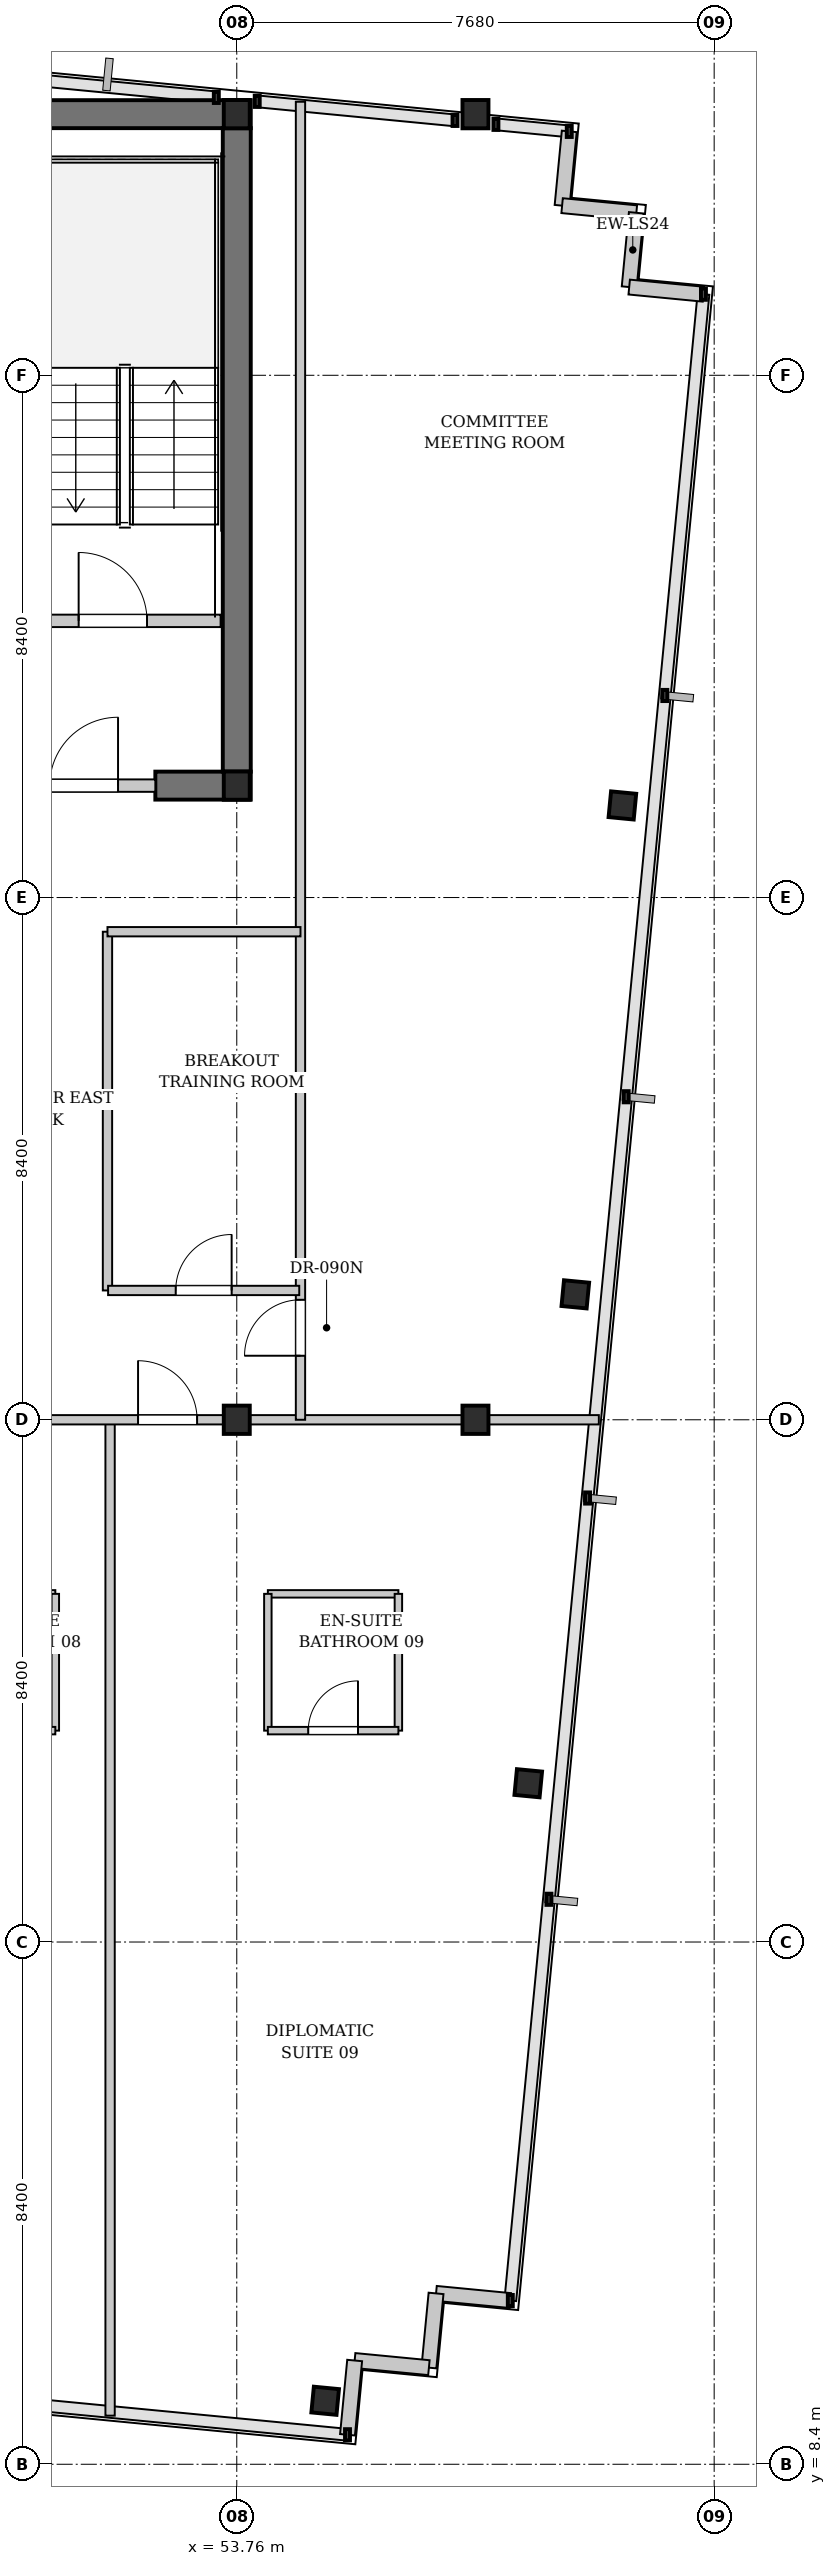
"""IFC4 building model, lengths in metres.
Left out: names, types, materials, properties, quantities, classifications, styles, units other than length and angle.
Written with IfcOpenShell. Run it as: python <this file> out.ifc"""

import sys

from ifc_helpers import new_model, si_unit, direction, frame, frame_2d, origin, origin_2d, place, context, subcontext, project, spatial, rectangle, i_section, extrude, element, fill, save


model = new_model("IFC4")
c1 = context("Model", 3, precision=1e-05, world=origin(), true_north=direction((0.0, 1.0)))
c2 = subcontext(c1, "Body", "Model", "MODEL_VIEW")
j1 = project(units=[si_unit("LENGTHUNIT", "METRE"), si_unit("PLANEANGLEUNIT", "RADIAN")], contexts=[c1])
p1 = place(None, origin())
s1 = spatial("IfcSite", under=j1, at=p1, CompositionType="ELEMENT")
p2 = place(p1, origin())
s2 = spatial("IfcBuilding", under=s1, at=p2, CompositionType="ELEMENT")
p3 = place(p2, frame((0.0, 0.0, 155.6)))
s3 = spatial("IfcBuildingStorey", under=s2, at=p3, CompositionType="ELEMENT", Elevation=155.6)
p4 = place(p3, frame((22.815, 46.2, 0.0), z_axis=(0.0, 0.0, 1.0), x_axis=(1.0, 0.0, 0.0)))
e1 = element("IfcWall", 1, at=p4, inside=s3, PredefinedType="SHEAR", context=c2, shape_type="SweptSolid", body=[
    extrude(rectangle(XDim=31.17, YDim=0.45, at=frame_2d((15.585, 0.0))), origin(), (0.0, 0.0, 1.0), 3.08),
])
p5 = place(p3, frame((52.45, 35.4, 0.0), z_axis=(0.0, 0.0, 1.0), x_axis=(1.0, 0.0, 0.0)))
e2 = element("IfcWall", 2, at=p5, inside=s3, PredefinedType="SHEAR", context=c2, shape_type="SweptSolid", body=[
    extrude(rectangle(XDim=1.535, YDim=0.45, at=frame_2d((0.768, 0.0))), origin(), (0.0, 0.0, 1.0), 3.08),
])
p6 = place(p3, frame((53.76, 35.625, 0.0), z_axis=(0.0, 0.0, 1.0), x_axis=(0.0, 1.0, 0.0)))
e3 = element("IfcWall", 3, at=p6, inside=s3, PredefinedType="SHEAR", context=c2, shape_type="SweptSolid", body=[
    extrude(rectangle(XDim=10.35, YDim=0.45, at=frame_2d((5.175, 0.0))), origin(), (0.0, 0.0, 1.0), 3.08),
])
for number, where, z_axis, x_axis in (
    (4, (53.76, 35.4, 0.0), (0.0, 0.0, 1.0), (1.0, 0.0, 0.0)),
    (5, (53.76, 46.2, 0.0), (0.0, 0.0, 1.0), (1.0, 0.0, 0.0)),
    (6, (53.76, 25.2, 0.0), (0.0, 0.0, 1.0), (1.0, 0.0, 0.0)),
    (7, (57.6, 25.2, 0.0), (0.0, 0.0, 1.0), (1.0, 0.0, 0.0)),
    (8, (57.6, 46.2, 0.0), (0.0, 0.0, 1.0), (1.0, 0.0, 0.0)),
):
    element("IfcColumn", number, at=place(p3, frame(where, z_axis=z_axis, x_axis=x_axis)), inside=s3, PredefinedType="COLUMN", context=c2, shape_type="SweptSolid", body=[
        extrude(i_section(OverallWidth=0.418, OverallDepth=0.455, WebThickness=0.042, FlangeThickness=0.068, FilletRadius=0.015, at=origin_2d()), origin(), (0.0, 0.0, 1.0), 3.3),
    ])
for number, where, z_axis, x_axis in (
    (9, (55.182, 9.421, 0.0), (0.0, 0.0, 1.0), (0.995, -0.096, 0.0)),
    (10, (58.449, 19.354, 0.0), (0.0, 0.0, 1.0), (0.995, -0.096, 0.0)),
    (11, (59.206, 27.218, 0.0), (0.0, 0.0, 1.0), (0.995, -0.096, 0.0)),
    (12, (59.963, 35.081, 0.0), (0.0, 0.0, 1.0), (0.995, -0.096, 0.0)),
):
    element("IfcColumn", number, at=place(p3, frame(where, z_axis=z_axis, x_axis=x_axis)), inside=s3, PredefinedType="COLUMN", context=c2, shape_type="SweptSolid", body=[
        extrude(i_section(OverallWidth=0.406, OverallDepth=0.416, WebThickness=0.03, FlangeThickness=0.048, FilletRadius=0.015, at=origin_2d()), origin(), (0.0, 0.0, 1.0), 3.3),
    ])
for number, where, z_axis, x_axis in (
    (13, (59.109, 45.923, 0.0), (0.0, 0.0, 1.0), (-0.096, -0.995, 0.0)),
    (14, (58.994, 44.729, 0.0), (0.0, 0.0, 1.0), (0.995, -0.096, 0.0)),
    (15, (60.188, 44.614, 0.0), (0.0, 0.0, 1.0), (-0.096, -0.995, 0.0)),
    (16, (60.073, 43.419, 0.0), (0.0, 0.0, 1.0), (0.995, -0.096, 0.0)),
    (17, (58.16, 11.033, 0.0), (0.0, 0.0, 1.0), (-0.995, 0.096, 0.0)),
):
    element("IfcWall", number, at=place(p3, frame(where, z_axis=z_axis, x_axis=x_axis)), inside=s3, PredefinedType="SOLIDWALL", context=c2, shape_type="SweptSolid", body=[
        extrude(rectangle(XDim=1.2, YDim=0.24, at=frame_2d((0.6, 0.0))), origin(), (0.0, 0.0, 1.0), 3.08),
    ])
for number, where, z_axis, x_axis in (
    (18, (56.966, 11.148, 0.0), (0.0, 0.0, 1.0), (-0.096, -0.995, 0.0)),
    (19, (56.851, 9.954, 0.0), (0.0, 0.0, 1.0), (-0.995, 0.096, 0.0)),
):
    element("IfcWall", number, at=place(p3, frame(where, z_axis=z_axis, x_axis=x_axis)), inside=s3, PredefinedType="SOLIDWALL", context=c2, shape_type="SweptSolid", body=[
        extrude(rectangle(XDim=1.2, YDim=0.24, at=frame_2d((0.6, 0.0))), origin(), (0.0, 0.0, 1.0), 3.08),
    ])
p7 = place(p3, frame((55.656, 10.069, 0.0), z_axis=(0.0, 0.0, 1.0), x_axis=(-0.095817067274, -0.995398960025, 0.0)))
e20 = element("IfcWall", 20, at=p7, inside=s3, PredefinedType="SOLIDWALL", context=c2, shape_type="SweptSolid", body=[
    extrude(rectangle(XDim=1.2, YDim=0.24, at=frame_2d((0.6, 0.0))), origin(), (0.0, 0.0, 1.0), 3.08),
])
p8 = place(p3, frame((49.78, 38.05, 0.0), z_axis=(0.0, 0.0, 1.0), x_axis=(1.0, 0.0, 0.0)))
e21 = element("IfcWall", 21, at=p8, inside=s3, PredefinedType="PARTITIONING", context=c2, shape_type="SweptSolid", body=[
    extrude(rectangle(XDim=3.72, YDim=0.2, at=frame_2d((1.86, 0.0))), origin(), (0.0, 0.0, 1.0), 3.08),
])
p9 = place(p8, frame((1.436, 0.0, 0.0)))
e22 = element("IfcOpeningElement", 22, at=p9, cuts=e21, PredefinedType="OPENING", context=c2, shape_type="SweptSolid", body=[
    extrude(rectangle(XDim=1.1, YDim=2.15, at=frame_2d((0.55, 1.075))), frame((0.0, 0.11, 0.0), z_axis=(0.0, -1.0, 0.0), x_axis=(1.0, 0.0, 0.0)), (0.0, 0.0, 1.0), 0.22),
])
p10 = place(p3, frame((50.15, 35.4, 0.0), z_axis=(0.0, 0.0, 1.0), x_axis=(1.0, 0.0, 0.0)))
e23 = element("IfcWall", 23, at=p10, inside=s3, PredefinedType="PARTITIONING", context=c2, shape_type="SweptSolid", body=[
    extrude(rectangle(XDim=2.3, YDim=0.2, at=frame_2d((1.15, 0.0))), origin(), (0.0, 0.0, 1.0), 2.475),
])
p11 = place(p10, frame((0.6, 0.0, 0.0)))
e24 = element("IfcOpeningElement", 24, at=p11, cuts=e23, PredefinedType="OPENING", context=c2, shape_type="SweptSolid", body=[
    extrude(rectangle(XDim=1.1, YDim=2.15, at=frame_2d((0.55, 1.075))), frame((0.0, 0.11, 0.0), z_axis=(0.0, -1.0, 0.0), x_axis=(1.0, 0.0, 0.0)), (0.0, 0.0, 1.0), 0.22),
])
p12 = place(p3, frame((48.741, 22.4, 0.0), z_axis=(0.0, 0.0, 1.0), x_axis=(1.0, 0.0, 0.0)))
e25 = element("IfcWall", 25, at=p12, inside=s3, PredefinedType="PARTITIONING", context=c2, shape_type="SweptSolid", body=[
    extrude(rectangle(XDim=2.1, YDim=0.12, at=frame_2d((1.05, 0.0))), origin(), (0.0, 0.0, 1.0), 3.08),
])
p13 = place(p3, frame((50.841, 20.2, 0.0), z_axis=(0.0, 0.0, 1.0), x_axis=(0.0, 1.0, 0.0)))
e26 = element("IfcWall", 26, at=p13, inside=s3, PredefinedType="PARTITIONING", context=c2, shape_type="SweptSolid", body=[
    extrude(rectangle(XDim=2.2, YDim=0.12, at=frame_2d((1.1, 0.0))), origin(), (0.0, 0.0, 1.0), 3.08),
])
p14 = place(p3, frame((48.741, 20.2, 0.0), z_axis=(0.0, 0.0, 1.0), x_axis=(1.0, 0.0, 0.0)))
e27 = element("IfcWall", 27, at=p14, inside=s3, PredefinedType="PARTITIONING", context=c2, shape_type="SweptSolid", body=[
    extrude(rectangle(XDim=2.1, YDim=0.12, at=frame_2d((1.05, 0.0))), origin(), (0.0, 0.0, 1.0), 3.08),
])
p15 = place(p14, frame((0.65, 0.0, 0.0)))
e28 = element("IfcOpeningElement", 28, at=p15, cuts=e27, PredefinedType="OPENING", context=c2, shape_type="SweptSolid", body=[
    extrude(rectangle(XDim=0.8, YDim=2.1, at=frame_2d((0.4, 1.05))), frame((0.0, 0.07, 0.0), z_axis=(0.0, -1.0, 0.0), x_axis=(1.0, 0.0, 0.0)), (0.0, 0.0, 1.0), 0.14),
])
p16 = place(p3, frame((54.26, 22.4, 0.0), z_axis=(0.0, 0.0, 1.0), x_axis=(1.0, 0.0, 0.0)))
e29 = element("IfcWall", 29, at=p16, inside=s3, PredefinedType="PARTITIONING", context=c2, shape_type="SweptSolid", body=[
    extrude(rectangle(XDim=2.1, YDim=0.12, at=frame_2d((1.05, 0.0))), origin(), (0.0, 0.0, 1.0), 3.08),
])
p17 = place(p3, frame((54.26, 20.2, 0.0), z_axis=(0.0, 0.0, 1.0), x_axis=(0.0, 1.0, 0.0)))
e30 = element("IfcWall", 30, at=p17, inside=s3, PredefinedType="PARTITIONING", context=c2, shape_type="SweptSolid", body=[
    extrude(rectangle(XDim=2.2, YDim=0.12, at=frame_2d((1.1, 0.0))), origin(), (0.0, 0.0, 1.0), 2.475),
])
p18 = place(p3, frame((56.36, 20.2, 0.0), z_axis=(0.0, 0.0, 1.0), x_axis=(0.0, 1.0, 0.0)))
e31 = element("IfcWall", 31, at=p18, inside=s3, PredefinedType="PARTITIONING", context=c2, shape_type="SweptSolid", body=[
    extrude(rectangle(XDim=2.2, YDim=0.12, at=frame_2d((1.1, 0.0))), origin(), (0.0, 0.0, 1.0), 3.08),
])
p19 = place(p3, frame((54.26, 20.2, 0.0), z_axis=(0.0, 0.0, 1.0), x_axis=(1.0, 0.0, 0.0)))
e32 = element("IfcWall", 32, at=p19, inside=s3, PredefinedType="PARTITIONING", context=c2, shape_type="SweptSolid", body=[
    extrude(rectangle(XDim=2.1, YDim=0.12, at=frame_2d((1.05, 0.0))), origin(), (0.0, 0.0, 1.0), 3.08),
])
p20 = place(p19, frame((0.65, 0.0, 0.0)))
e33 = element("IfcOpeningElement", 33, at=p20, cuts=e32, PredefinedType="OPENING", context=c2, shape_type="SweptSolid", body=[
    extrude(rectangle(XDim=0.8, YDim=2.1, at=frame_2d((0.4, 1.05))), frame((0.0, 0.07, 0.0), z_axis=(0.0, -1.0, 0.0), x_axis=(1.0, 0.0, 0.0)), (0.0, 0.0, 1.0), 0.14),
])
p21 = place(p3, frame((51.722, 9.182, 0.0), z_axis=(0.0, 0.0, 1.0), x_axis=(0.0, 1.0, 0.0)))
e34 = element("IfcWall", 34, at=p21, inside=s3, PredefinedType="PARTITIONING", context=c2, shape_type="SweptSolid", body=[
    extrude(rectangle(XDim=16.038, YDim=0.15, at=frame_2d((8.019, 0.0))), origin(), (0.0, 0.0, 1.0), 3.08),
])
p22 = place(p3, frame((2.08, 25.2, 0.0), z_axis=(0.0, 0.0, 1.0), x_axis=(1.0, 0.0, 0.0)))
e35 = element("IfcWall", 35, at=p22, inside=s3, PredefinedType="PARTITIONING", context=c2, shape_type="SweptSolid", body=[
    extrude(rectangle(XDim=57.505, YDim=0.15, at=frame_2d((28.752, 0.0))), origin(), (0.0, 0.0, 1.0), 2.475),
])
p23 = place(p22, frame((8.662, 0.0, 0.0)))
e36 = element("IfcOpeningElement", 36, at=p23, cuts=e35, PredefinedType="OPENING", context=c2, shape_type="SweptSolid", body=[
    extrude(rectangle(XDim=0.95, YDim=2.15, at=frame_2d((0.475, 1.075))), frame((0.0, 0.085, 0.0), z_axis=(0.0, -1.0, 0.0), x_axis=(1.0, 0.0, 0.0)), (0.0, 0.0, 1.0), 0.17),
])
p24 = place(p22, frame((13.504, 0.0, 0.0)))
e37 = element("IfcOpeningElement", 37, at=p24, cuts=e35, PredefinedType="OPENING", context=c2, shape_type="SweptSolid", body=[
    extrude(rectangle(XDim=0.95, YDim=2.15, at=frame_2d((0.475, 1.075))), frame((0.0, 0.085, 0.0), z_axis=(0.0, -1.0, 0.0), x_axis=(1.0, 0.0, 0.0)), (0.0, 0.0, 1.0), 0.17),
])
p25 = place(p22, frame((18.512, 0.0, 0.0)))
e38 = element("IfcOpeningElement", 38, at=p25, cuts=e35, PredefinedType="OPENING", context=c2, shape_type="SweptSolid", body=[
    extrude(rectangle(XDim=0.95, YDim=2.15, at=frame_2d((0.475, 1.075))), frame((0.0, 0.085, 0.0), z_axis=(0.0, -1.0, 0.0), x_axis=(1.0, 0.0, 0.0)), (0.0, 0.0, 1.0), 0.17),
])
p26 = place(p22, frame((24.937, 0.0, 0.0)))
e39 = element("IfcOpeningElement", 39, at=p26, cuts=e35, PredefinedType="OPENING", context=c2, shape_type="SweptSolid", body=[
    extrude(rectangle(XDim=0.95, YDim=2.15, at=frame_2d((0.475, 1.075))), frame((0.0, 0.085, 0.0), z_axis=(0.0, -1.0, 0.0), x_axis=(1.0, 0.0, 0.0)), (0.0, 0.0, 1.0), 0.17),
])
p27 = place(p22, frame((31.044, 0.0, 0.0)))
e40 = element("IfcOpeningElement", 40, at=p27, cuts=e35, PredefinedType="OPENING", context=c2, shape_type="SweptSolid", body=[
    extrude(rectangle(XDim=0.95, YDim=2.15, at=frame_2d((0.475, 1.075))), frame((0.0, 0.085, 0.0), z_axis=(0.0, -1.0, 0.0), x_axis=(1.0, 0.0, 0.0)), (0.0, 0.0, 1.0), 0.17),
])
p28 = place(p22, frame((37.897, 0.0, 0.0)))
e41 = element("IfcOpeningElement", 41, at=p28, cuts=e35, PredefinedType="OPENING", context=c2, shape_type="SweptSolid", body=[
    extrude(rectangle(XDim=0.95, YDim=2.15, at=frame_2d((0.475, 1.075))), frame((0.0, 0.085, 0.0), z_axis=(0.0, -1.0, 0.0), x_axis=(1.0, 0.0, 0.0)), (0.0, 0.0, 1.0), 0.17),
])
p29 = place(p22, frame((41.489, 0.0, 0.0)))
e42 = element("IfcOpeningElement", 42, at=p29, cuts=e35, PredefinedType="OPENING", context=c2, shape_type="SweptSolid", body=[
    extrude(rectangle(XDim=0.95, YDim=2.15, at=frame_2d((0.475, 1.075))), frame((0.0, 0.085, 0.0), z_axis=(0.0, -1.0, 0.0), x_axis=(1.0, 0.0, 0.0)), (0.0, 0.0, 1.0), 0.17),
])
p30 = place(p22, frame((47.351, 0.0, 0.0)))
e43 = element("IfcOpeningElement", 43, at=p30, cuts=e35, PredefinedType="OPENING", context=c2, shape_type="SweptSolid", body=[
    extrude(rectangle(XDim=0.95, YDim=2.15, at=frame_2d((0.475, 1.075))), frame((0.0, 0.085, 0.0), z_axis=(0.0, -1.0, 0.0), x_axis=(1.0, 0.0, 0.0)), (0.0, 0.0, 1.0), 0.17),
])
p31 = place(p22, frame((50.092, 0.0, 0.0)))
e44 = element("IfcOpeningElement", 44, at=p31, cuts=e35, PredefinedType="OPENING", context=c2, shape_type="SweptSolid", body=[
    extrude(rectangle(XDim=0.95, YDim=2.15, at=frame_2d((0.475, 1.075))), frame((0.0, 0.085, 0.0), z_axis=(0.0, -1.0, 0.0), x_axis=(1.0, 0.0, 0.0)), (0.0, 0.0, 1.0), 0.17),
])
p32 = place(p3, frame((54.785, 25.2, 0.0), z_axis=(0.0, 0.0, 1.0), x_axis=(0.0, 1.0, 0.0)))
e45 = element("IfcWall", 45, at=p32, inside=s3, PredefinedType="PARTITIONING", context=c2, shape_type="SweptSolid", body=[
    extrude(rectangle(XDim=21.2, YDim=0.15, at=frame_2d((10.6, 0.0))), origin(), (0.0, 0.0, 1.0), 3.08),
])
p33 = place(p32, frame((1.03, 0.0, 0.0)))
e46 = element("IfcOpeningElement", 46, at=p33, cuts=e45, PredefinedType="OPENING", context=c2, shape_type="SweptSolid", body=[
    extrude(rectangle(XDim=0.9, YDim=2.15, at=frame_2d((0.45, 1.075))), frame((0.0, 0.085, 0.0), z_axis=(0.0, -1.0, 0.0), x_axis=(1.0, 0.0, 0.0)), (0.0, 0.0, 1.0), 0.17),
])
p34 = place(p3, frame((51.68, 27.28, 0.0), z_axis=(0.0, 0.0, 1.0), x_axis=(0.0, 1.0, 0.0)))
e47 = element("IfcWall", 47, at=p34, inside=s3, PredefinedType="PARTITIONING", context=c2, shape_type="SweptSolid", body=[
    extrude(rectangle(XDim=5.77, YDim=0.15, at=frame_2d((2.885, 0.0))), origin(), (0.0, 0.0, 1.0), 3.08),
])
p35 = place(p3, frame((51.68, 33.05, 0.0), z_axis=(0.0, 0.0, 1.0), x_axis=(1.0, 0.0, 0.0)))
e48 = element("IfcWall", 48, at=p35, inside=s3, PredefinedType="PARTITIONING", context=c2, shape_type="SweptSolid", body=[
    extrude(rectangle(XDim=3.105, YDim=0.15, at=frame_2d((1.552, 0.0))), origin(), (0.0, 0.0, 1.0), 3.08),
])
p36 = place(p3, frame((51.69, 27.28, 0.0), z_axis=(0.0, 0.0, 1.0), x_axis=(1.0, 0.0, 0.0)))
e49 = element("IfcWall", 49, at=p36, inside=s3, PredefinedType="PARTITIONING", context=c2, shape_type="SweptSolid", body=[
    extrude(rectangle(XDim=3.075, YDim=0.15, at=frame_2d((1.538, 0.0))), origin(), (0.0, 0.0, 1.0), 3.08),
])
p37 = place(p36, frame((1.087, 0.0, 0.0)))
e50 = element("IfcOpeningElement", 50, at=p37, cuts=e49, PredefinedType="OPENING", context=c2, shape_type="SweptSolid", body=[
    extrude(rectangle(XDim=0.9, YDim=2.15, at=frame_2d((0.45, 1.075))), frame((0.0, 0.085, 0.0), z_axis=(0.0, -1.0, 0.0), x_axis=(1.0, 0.0, 0.0)), (0.0, 0.0, 1.0), 0.17),
])
p38 = place(p9, origin())
e51 = element("IfcDoor", 51, at=p38, inside=s3, OperationType="SINGLE_SWING_LEFT", PredefinedType="DOOR", context=c2, shape_type="SweptSolid", body=[
    extrude(rectangle(XDim=1.1, YDim=2.15, at=frame_2d((0.55, 1.075))), frame((0.0, 0.025, 0.0), z_axis=(0.0, -1.0, 0.0), x_axis=(1.0, 0.0, 0.0)), (0.0, 0.0, 1.0), 0.05),
])
fill(e22, e51)
p39 = place(p11, origin())
e52 = element("IfcDoor", 52, at=p39, inside=s3, OperationType="SINGLE_SWING_RIGHT", PredefinedType="DOOR", context=c2, shape_type="SweptSolid", body=[
    extrude(rectangle(XDim=1.1, YDim=2.15, at=frame_2d((0.55, 1.075))), frame((0.0, 0.025, 0.0), z_axis=(0.0, -1.0, 0.0), x_axis=(1.0, 0.0, 0.0)), (0.0, 0.0, 1.0), 0.05),
])
fill(e24, e52)
p40 = place(p20, origin())
e53 = element("IfcDoor", 53, at=p40, inside=s3, OperationType="SINGLE_SWING_RIGHT", PredefinedType="DOOR", context=c2, shape_type="SweptSolid", body=[
    extrude(rectangle(XDim=0.8, YDim=2.1, at=frame_2d((0.4, 1.05))), frame((0.0, 0.025, 0.0), z_axis=(0.0, -1.0, 0.0), x_axis=(1.0, 0.0, 0.0)), (0.0, 0.0, 1.0), 0.05),
])
fill(e33, e53)
p41 = place(p31, origin())
e54 = element("IfcDoor", 54, at=p41, inside=s3, OperationType="SINGLE_SWING_LEFT", PredefinedType="DOOR", context=c2, shape_type="SweptSolid", body=[
    extrude(rectangle(XDim=0.95, YDim=2.15, at=frame_2d((0.475, 1.075))), frame((0.0, 0.025, 0.0), z_axis=(0.0, -1.0, 0.0), x_axis=(1.0, 0.0, 0.0)), (0.0, 0.0, 1.0), 0.05),
])
fill(e44, e54)
p42 = place(p33, origin())
e55 = element("IfcDoor", 55, at=p42, inside=s3, OperationType="SINGLE_SWING_LEFT", PredefinedType="DOOR", context=c2, shape_type="SweptSolid", body=[
    extrude(rectangle(XDim=0.9, YDim=2.15, at=frame_2d((0.45, 1.075))), frame((0.0, 0.025, 0.0), z_axis=(0.0, -1.0, 0.0), x_axis=(1.0, 0.0, 0.0)), (0.0, 0.0, 1.0), 0.05),
])
fill(e46, e55)
p43 = place(p37, origin())
e56 = element("IfcDoor", 56, at=p43, inside=s3, OperationType="SINGLE_SWING_RIGHT", PredefinedType="DOOR", context=c2, shape_type="SweptSolid", body=[
    extrude(rectangle(XDim=0.9, YDim=2.15, at=frame_2d((0.45, 1.075))), frame((0.0, 0.025, 0.0), z_axis=(0.0, -1.0, 0.0), x_axis=(1.0, 0.0, 0.0)), (0.0, 0.0, 1.0), 0.05),
])
fill(e50, e56)
save(model, sys.argv[1])
